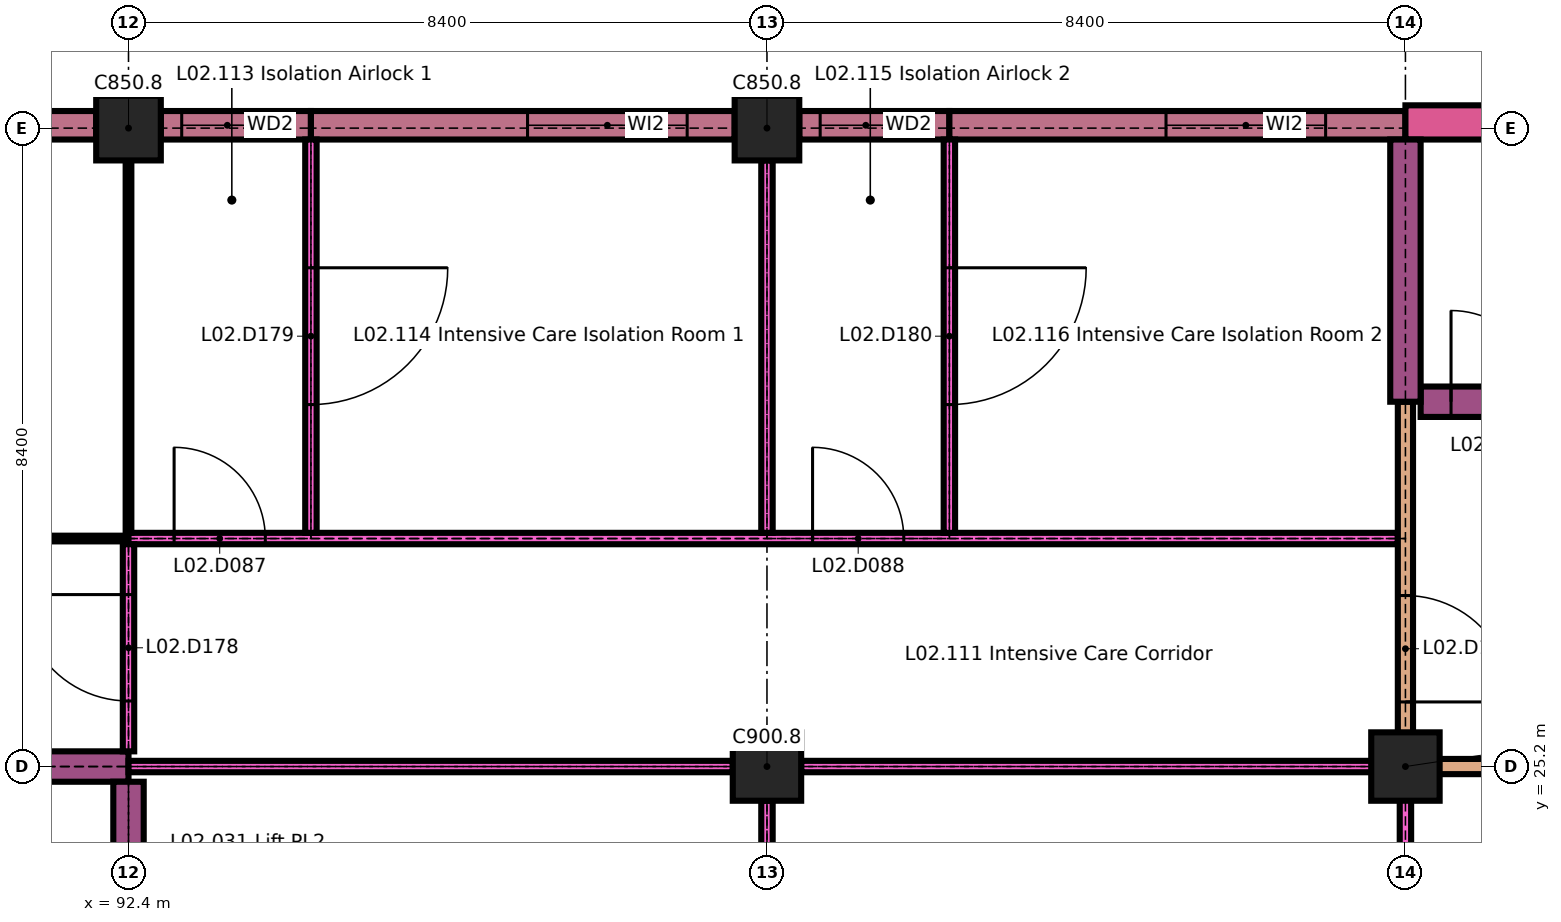
"""IFC4 building model, lengths in metres.
Left out: names, types, materials, properties, quantities, classifications, styles, units other than length and angle.
Written with IfcOpenShell. Run it as: python <this file> out.ifc"""

import sys

from ifc_helpers import new_model, si_unit, direction, frame, frame_2d, origin, origin_2d, place, context, subcontext, project, spatial, rectangle, extrude, element, fill, save


model = new_model("IFC4")
c1 = context("Model", 3, precision=1e-05, world=origin(), true_north=direction((0.0, 1.0)))
c2 = subcontext(c1, "Body", "Model", "MODEL_VIEW")
j1 = project(units=[si_unit("LENGTHUNIT", "METRE"), si_unit("PLANEANGLEUNIT", "RADIAN")], contexts=[c1])
p1 = place(None, origin())
s1 = spatial("IfcSite", under=j1, at=p1, CompositionType="ELEMENT")
p2 = place(p1, origin())
s2 = spatial("IfcBuilding", under=s1, at=p2, CompositionType="ELEMENT")
p3 = place(p2, frame((0.0, 0.0, 8.4)))
s3 = spatial("IfcBuildingStorey", under=s2, at=p3, CompositionType="ELEMENT", Elevation=8.4)
p4 = place(p3, frame((100.8, 25.2, 0.0), z_axis=(0.0, 0.0, 1.0), x_axis=(1.0, 0.0, 0.0)))
e1 = element("IfcColumn", 1, at=p4, inside=s3, PredefinedType="COLUMN", context=c2, shape_type="SweptSolid", body=[
    extrude(rectangle(XDim=0.9, YDim=0.9, at=origin_2d()), origin(), (0.0, 0.0, 1.0), 4.2),
])
for number, where, z_axis, x_axis in (
    (2, (92.4, 33.6, 0.0), (0.0, 0.0, 1.0), (1.0, 0.0, 0.0)),
    (3, (100.8, 33.6, 0.0), (0.0, 0.0, 1.0), (1.0, 0.0, 0.0)),
):
    element("IfcColumn", number, at=place(p3, frame(where, z_axis=z_axis, x_axis=x_axis)), inside=s3, PredefinedType="COLUMN", context=c2, shape_type="SweptSolid", body=[
        extrude(rectangle(XDim=0.85, YDim=0.85, at=origin_2d()), origin(), (0.0, 0.0, 1.0), 4.2),
    ])
p5 = place(p3, frame((84.425, 33.637, 0.0), z_axis=(0.0, 0.0, 1.0), x_axis=(1.0, 0.0, 0.0)))
e4 = element("IfcWall", 4, at=p5, inside=s3, PredefinedType="SOLIDWALL", context=c2, shape_type="SweptSolid", body=[
    extrude(rectangle(XDim=7.55, YDim=0.375, at=frame_2d((3.775, 0.0))), origin(), (0.0, 0.0, 1.0), 3.9),
])
p6 = place(p5, frame((0.925, 0.0, 0.9)))
e5 = element("IfcOpeningElement", 5, at=p6, cuts=e4, PredefinedType="OPENING", context=c2, shape_type="SweptSolid", body=[
    extrude(rectangle(XDim=1.5, YDim=2.1, at=frame_2d((0.75, 1.05))), frame((0.0, 0.198, 0.0), z_axis=(0.0, -1.0, 0.0), x_axis=(1.0, 0.0, 0.0)), (0.0, 0.0, 1.0), 0.395),
])
p7 = place(p5, frame((5.125, 0.0, 0.9)))
e6 = element("IfcOpeningElement", 6, at=p7, cuts=e4, PredefinedType="OPENING", context=c2, shape_type="SweptSolid", body=[
    extrude(rectangle(XDim=1.5, YDim=2.1, at=frame_2d((0.75, 1.05))), frame((0.0, 0.198, 0.0), z_axis=(0.0, -1.0, 0.0), x_axis=(1.0, 0.0, 0.0)), (0.0, 0.0, 1.0), 0.395),
])
p8 = place(p3, frame((92.825, 33.637, 0.0), z_axis=(0.0, 0.0, 1.0), x_axis=(1.0, 0.0, 0.0)))
e7 = element("IfcWall", 7, at=p8, inside=s3, PredefinedType="SOLIDWALL", context=c2, shape_type="SweptSolid", body=[
    extrude(rectangle(XDim=1.975, YDim=0.375, at=frame_2d((0.988, 0.0))), origin(), (0.0, 0.0, 1.0), 3.9),
])
p9 = place(p8, frame((0.275, 0.0, 0.9)))
e8 = element("IfcOpeningElement", 8, at=p9, cuts=e7, PredefinedType="OPENING", context=c2, shape_type="SweptSolid", body=[
    extrude(rectangle(XDim=1.2, YDim=2.1, at=frame_2d((0.6, 1.05))), frame((0.0, 0.198, 0.0), z_axis=(0.0, -1.0, 0.0), x_axis=(1.0, 0.0, 0.0)), (0.0, 0.0, 1.0), 0.395),
])
p10 = place(p3, frame((94.8, 33.637, 0.0), z_axis=(0.0, 0.0, 1.0), x_axis=(1.0, 0.0, 0.0)))
e9 = element("IfcWall", 9, at=p10, inside=s3, PredefinedType="SOLIDWALL", context=c2, shape_type="SweptSolid", body=[
    extrude(rectangle(XDim=5.575, YDim=0.375, at=frame_2d((2.788, 0.0))), origin(), (0.0, 0.0, 1.0), 3.9),
])
p11 = place(p10, frame((2.85, 0.0, 0.9)))
e10 = element("IfcOpeningElement", 10, at=p11, cuts=e9, PredefinedType="OPENING", context=c2, shape_type="SweptSolid", body=[
    extrude(rectangle(XDim=2.1, YDim=2.1, at=frame_2d((1.05, 1.05))), frame((0.0, 0.198, 0.0), z_axis=(0.0, -1.0, 0.0), x_axis=(1.0, 0.0, 0.0)), (0.0, 0.0, 1.0), 0.395),
])
p12 = place(p3, frame((101.225, 33.637, 0.0), z_axis=(0.0, 0.0, 1.0), x_axis=(1.0, 0.0, 0.0)))
e11 = element("IfcWall", 11, at=p12, inside=s3, PredefinedType="SOLIDWALL", context=c2, shape_type="SweptSolid", body=[
    extrude(rectangle(XDim=1.975, YDim=0.375, at=frame_2d((0.987, 0.0))), origin(), (0.0, 0.0, 1.0), 3.9),
])
p13 = place(p12, frame((0.275, 0.0, 0.9)))
e12 = element("IfcOpeningElement", 12, at=p13, cuts=e11, PredefinedType="OPENING", context=c2, shape_type="SweptSolid", body=[
    extrude(rectangle(XDim=1.2, YDim=2.1, at=frame_2d((0.6, 1.05))), frame((0.0, 0.198, 0.0), z_axis=(0.0, -1.0, 0.0), x_axis=(1.0, 0.0, 0.0)), (0.0, 0.0, 1.0), 0.395),
])
p14 = place(p3, frame((103.2, 33.637, 0.0), z_axis=(0.0, 0.0, 1.0), x_axis=(1.0, 0.0, 0.0)))
e13 = element("IfcWall", 13, at=p14, inside=s3, PredefinedType="SOLIDWALL", context=c2, shape_type="SweptSolid", body=[
    extrude(rectangle(XDim=6.0, YDim=0.375, at=frame_2d((3.0, 0.0))), origin(), (0.0, 0.0, 1.0), 3.9),
])
p15 = place(p14, frame((2.85, 0.0, 0.9)))
e14 = element("IfcOpeningElement", 14, at=p15, cuts=e13, PredefinedType="OPENING", context=c2, shape_type="SweptSolid", body=[
    extrude(rectangle(XDim=2.1, YDim=2.1, at=frame_2d((1.05, 1.05))), frame((0.0, 0.198, 0.0), z_axis=(0.0, -1.0, 0.0), x_axis=(1.0, 0.0, 0.0)), (0.0, 0.0, 1.0), 0.395),
])
p16 = place(p3, frame((109.2, 33.675, 0.0), z_axis=(0.0, 0.0, 1.0), x_axis=(1.0, 0.0, 0.0)))
e15 = element("IfcWall", 15, at=p16, inside=s3, PredefinedType="SOLIDWALL", context=c2, shape_type="SweptSolid", body=[
    extrude(rectangle(XDim=3.15, YDim=0.45, at=frame_2d((1.575, 0.0))), origin(), (0.0, 0.0, 1.0), 4.2),
])
p17 = place(p3, frame((75.6, 25.2, 0.0), z_axis=(0.0, 0.0, 1.0), x_axis=(1.0, 0.0, 0.0)))
e16 = element("IfcWall", 16, at=p17, inside=s3, PredefinedType="SHEAR", context=c2, shape_type="SweptSolid", body=[
    extrude(rectangle(XDim=16.8, YDim=0.4, at=frame_2d((8.4, 0.0))), origin(), (0.0, 0.0, 1.0), 4.2),
])
p18 = place(p3, frame((92.4, 25.2, 0.0), z_axis=(0.0, 0.0, 1.0), x_axis=(1.0, 0.0, 0.0)))
e17 = element("IfcWall", 17, at=p18, inside=s3, PredefinedType="PARTITIONING", context=c2, shape_type="SweptSolid", body=[
    extrude(rectangle(XDim=7.95, YDim=0.15, at=frame_2d((3.975, 0.0))), origin(), (0.0, 0.0, 1.0), 4.2),
])
p19 = place(p3, frame((101.25, 25.2, 0.0), z_axis=(0.0, 0.0, 1.0), x_axis=(1.0, 0.0, 0.0)))
e18 = element("IfcWall", 18, at=p19, inside=s3, PredefinedType="PARTITIONING", context=c2, shape_type="SweptSolid", body=[
    extrude(rectangle(XDim=7.95, YDim=0.15, at=frame_2d((3.975, 0.0))), origin(), (0.0, 0.0, 1.0), 4.2),
])
p20 = place(p3, frame((109.2, 25.2, 0.0), z_axis=(0.0, 0.0, 1.0), x_axis=(1.0, 0.0, 0.0)))
e19 = element("IfcWall", 19, at=p20, inside=s3, PredefinedType="PARTITIONING", context=c2, shape_type="SweptSolid", body=[
    extrude(rectangle(XDim=8.4, YDim=0.2, at=frame_2d((4.2, 0.0))), origin(), (0.0, 0.0, 1.0), 4.2),
])
p21 = place(p20, frame((3.5, 0.0, 0.0)))
e20 = element("IfcOpeningElement", 20, at=p21, cuts=e19, PredefinedType="OPENING", context=c2, shape_type="SweptSolid", body=[
    extrude(rectangle(XDim=1.4, YDim=2.1, at=frame_2d((0.7, 1.05))), frame((0.0, 0.11, 0.0), z_axis=(0.0, -1.0, 0.0), x_axis=(1.0, 0.0, 0.0)), (0.0, 0.0, 1.0), 0.22),
])
p22 = place(p3, frame((84.0, 28.2, 0.0), z_axis=(0.0, 0.0, 1.0), x_axis=(1.0, 0.0, 0.0)))
e21 = element("IfcWall", 21, at=p22, inside=s3, PredefinedType="PARTITIONING", context=c2, shape_type="SweptSolid", body=[
    extrude(rectangle(XDim=8.4, YDim=0.075, at=frame_2d((4.2, 0.0))), origin(), (0.0, 0.0, 1.0), 4.2),
])
p23 = place(p22, frame((3.65, 0.0, 0.0)))
e22 = element("IfcOpeningElement", 22, at=p23, cuts=e21, PredefinedType="OPENING", context=c2, shape_type="SweptSolid", body=[
    extrude(rectangle(XDim=1.1, YDim=2.1, at=frame_2d((0.55, 1.05))), frame((0.0, 0.047, 0.0), z_axis=(0.0, -1.0, 0.0), x_axis=(1.0, 0.0, 0.0)), (0.0, 0.0, 1.0), 0.095),
])
p24 = place(p3, frame((92.4, 28.2, 0.0), z_axis=(0.0, 0.0, 1.0), x_axis=(1.0, 0.0, 0.0)))
e23 = element("IfcWall", 23, at=p24, inside=s3, PredefinedType="PARTITIONING", context=c2, shape_type="SweptSolid", body=[
    extrude(rectangle(XDim=16.7, YDim=0.15, at=frame_2d((8.35, 0.0))), origin(), (0.0, 0.0, 1.0), 4.2),
])
p25 = place(p24, frame((0.6, 0.0, 0.0)))
e24 = element("IfcOpeningElement", 24, at=p25, cuts=e23, PredefinedType="OPENING", context=c2, shape_type="SweptSolid", body=[
    extrude(rectangle(XDim=1.2, YDim=2.1, at=frame_2d((0.6, 1.05))), frame((0.0, 0.085, 0.0), z_axis=(0.0, -1.0, 0.0), x_axis=(1.0, 0.0, 0.0)), (0.0, 0.0, 1.0), 0.17),
])
p26 = place(p24, frame((9.0, 0.0, 0.0)))
e25 = element("IfcOpeningElement", 25, at=p26, cuts=e23, PredefinedType="OPENING", context=c2, shape_type="SweptSolid", body=[
    extrude(rectangle(XDim=1.2, YDim=2.1, at=frame_2d((0.6, 1.05))), frame((0.0, 0.085, 0.0), z_axis=(0.0, -1.0, 0.0), x_axis=(1.0, 0.0, 0.0)), (0.0, 0.0, 1.0), 0.17),
])
p27 = place(p3, frame((109.4, 30.0, 0.0), z_axis=(0.0, 0.0, 1.0), x_axis=(1.0, 0.0, 0.0)))
e26 = element("IfcWall", 26, at=p27, inside=s3, PredefinedType="SHEAR", context=c2, shape_type="SweptSolid", body=[
    extrude(rectangle(XDim=8.0, YDim=0.4, at=frame_2d((4.0, 0.0))), origin(), (0.0, 0.0, 1.0), 4.2),
])
p28 = place(p27, frame((0.4, 0.0, 0.0)))
e27 = element("IfcOpeningElement", 27, at=p28, cuts=e26, PredefinedType="OPENING", context=c2, shape_type="SweptSolid", body=[
    extrude(rectangle(XDim=1.2, YDim=2.1, at=frame_2d((0.6, 1.05))), frame((0.0, 0.21, 0.0), z_axis=(0.0, -1.0, 0.0), x_axis=(1.0, 0.0, 0.0)), (0.0, 0.0, 1.0), 0.42),
])
p29 = place(p3, frame((92.4, 21.6, 0.0), z_axis=(0.0, 0.0, 1.0), x_axis=(0.0, 1.0, 0.0)))
e28 = element("IfcWall", 28, at=p29, inside=s3, PredefinedType="SHEAR", context=c2, shape_type="SweptSolid", body=[
    extrude(rectangle(XDim=3.4, YDim=0.4, at=frame_2d((1.7, 0.0))), origin(), (0.0, 0.0, 1.0), 4.2),
])
p30 = place(p3, frame((92.4, 25.4, 0.0), z_axis=(0.0, 0.0, 1.0), x_axis=(0.0, 1.0, 0.0)))
e29 = element("IfcWall", 29, at=p30, inside=s3, PredefinedType="PARTITIONING", context=c2, shape_type="SweptSolid", body=[
    extrude(rectangle(XDim=2.725, YDim=0.15, at=frame_2d((1.363, 0.0))), origin(), (0.0, 0.0, 1.0), 4.2),
])
p31 = place(p30, frame((0.663, 0.0, 0.0)))
e30 = element("IfcOpeningElement", 30, at=p31, cuts=e29, PredefinedType="OPENING", context=c2, shape_type="SweptSolid", body=[
    extrude(rectangle(XDim=1.4, YDim=2.1, at=frame_2d((0.7, 1.05))), frame((0.0, 0.085, 0.0), z_axis=(0.0, -1.0, 0.0), x_axis=(1.0, 0.0, 0.0)), (0.0, 0.0, 1.0), 0.17),
])
p32 = place(p3, frame((92.4, 28.275, 0.0), z_axis=(0.0, 0.0, 1.0), x_axis=(0.0, 1.0, 0.0)))
e31 = element("IfcWall", 31, at=p32, inside=s3, PredefinedType="PARTITIONING", context=c2, shape_type="SweptSolid", body=[
    extrude(rectangle(XDim=4.9, YDim=0.075, at=frame_2d((2.45, 0.0))), origin(), (0.0, 0.0, 1.0), 4.2),
])
p33 = place(p3, frame((94.8, 28.275, 0.0), z_axis=(0.0, 0.0, 1.0), x_axis=(0.0, 1.0, 0.0)))
e32 = element("IfcWall", 32, at=p33, inside=s3, PredefinedType="PARTITIONING", context=c2, shape_type="SweptSolid", body=[
    extrude(rectangle(XDim=5.175, YDim=0.15, at=frame_2d((2.587, 0.0))), origin(), (0.0, 0.0, 1.0), 4.2),
])
p34 = place(p33, frame((1.688, 0.0, 0.0)))
e33 = element("IfcOpeningElement", 33, at=p34, cuts=e32, PredefinedType="OPENING", context=c2, shape_type="SweptSolid", body=[
    extrude(rectangle(XDim=1.8, YDim=2.4, at=frame_2d((0.9, 1.2))), frame((0.0, 0.085, 0.0), z_axis=(0.0, -1.0, 0.0), x_axis=(1.0, 0.0, 0.0)), (0.0, 0.0, 1.0), 0.17),
])
p35 = place(p3, frame((100.8, 17.25, 0.0), z_axis=(0.0, 0.0, 1.0), x_axis=(0.0, 1.0, 0.0)))
e34 = element("IfcWall", 34, at=p35, inside=s3, PredefinedType="PARTITIONING", context=c2, shape_type="SweptSolid", body=[
    extrude(rectangle(XDim=7.5, YDim=0.15, at=frame_2d((3.75, 0.0))), origin(), (0.0, 0.0, 1.0), 4.2),
])
p36 = place(p3, frame((100.8, 28.275, 0.0), z_axis=(0.0, 0.0, 1.0), x_axis=(0.0, 1.0, 0.0)))
e35 = element("IfcWall", 35, at=p36, inside=s3, PredefinedType="PARTITIONING", context=c2, shape_type="SweptSolid", body=[
    extrude(rectangle(XDim=4.9, YDim=0.15, at=frame_2d((2.45, 0.0))), origin(), (0.0, 0.0, 1.0), 4.2),
])
p37 = place(p3, frame((103.2, 28.275, 0.0), z_axis=(0.0, 0.0, 1.0), x_axis=(0.0, 1.0, 0.0)))
e36 = element("IfcWall", 36, at=p37, inside=s3, PredefinedType="PARTITIONING", context=c2, shape_type="SweptSolid", body=[
    extrude(rectangle(XDim=5.175, YDim=0.15, at=frame_2d((2.587, 0.0))), origin(), (0.0, 0.0, 1.0), 4.2),
])
p38 = place(p37, frame((1.688, 0.0, 0.0)))
e37 = element("IfcOpeningElement", 37, at=p38, cuts=e36, PredefinedType="OPENING", context=c2, shape_type="SweptSolid", body=[
    extrude(rectangle(XDim=1.8, YDim=2.4, at=frame_2d((0.9, 1.2))), frame((0.0, 0.085, 0.0), z_axis=(0.0, -1.0, 0.0), x_axis=(1.0, 0.0, 0.0)), (0.0, 0.0, 1.0), 0.17),
])
p39 = place(p3, frame((109.2, 17.25, 0.0), z_axis=(0.0, 0.0, 1.0), x_axis=(0.0, 1.0, 0.0)))
e38 = element("IfcWall", 38, at=p39, inside=s3, PredefinedType="PARTITIONING", context=c2, shape_type="SweptSolid", body=[
    extrude(rectangle(XDim=7.85, YDim=0.15, at=frame_2d((3.925, 0.0))), origin(), (0.0, 0.0, 1.0), 4.2),
])
p40 = place(p3, frame((109.2, 25.3, 0.0), z_axis=(0.0, 0.0, 1.0), x_axis=(0.0, 1.0, 0.0)))
e39 = element("IfcWall", 39, at=p40, inside=s3, PredefinedType="PARTITIONING", context=c2, shape_type="SweptSolid", body=[
    extrude(rectangle(XDim=4.7, YDim=0.2, at=frame_2d((2.35, 0.0))), origin(), (0.0, 0.0, 1.0), 4.2),
])
p41 = place(p40, frame((0.75, 0.0, 0.0)))
e40 = element("IfcOpeningElement", 40, at=p41, cuts=e39, PredefinedType="OPENING", context=c2, shape_type="SweptSolid", body=[
    extrude(rectangle(XDim=1.4, YDim=2.1, at=frame_2d((0.7, 1.05))), frame((0.0, 0.11, 0.0), z_axis=(0.0, -1.0, 0.0), x_axis=(1.0, 0.0, 0.0)), (0.0, 0.0, 1.0), 0.22),
])
p42 = place(p3, frame((109.2, 30.0, 0.0), z_axis=(0.0, 0.0, 1.0), x_axis=(0.0, 1.0, 0.0)))
e41 = element("IfcWall", 41, at=p42, inside=s3, PredefinedType="SHEAR", context=c2, shape_type="SweptSolid", body=[
    extrude(rectangle(XDim=3.45, YDim=0.4, at=frame_2d((1.725, 0.0))), origin(), (0.0, 0.0, 1.0), 4.2),
])
p43 = place(p3, frame((109.2, 25.2, 0.0), z_axis=(0.0, 0.0, 1.0), x_axis=(1.0, 0.0, 0.0)))
e42 = element("IfcColumn", 42, at=p43, inside=s3, PredefinedType="COLUMN", context=c2, shape_type="SweptSolid", body=[
    extrude(rectangle(XDim=0.9, YDim=0.9, at=origin_2d()), origin(), (0.0, 0.0, 1.0), 4.2),
])
p44 = place(p9, origin())
e43 = element("IfcWindow", 43, at=p44, inside=s3, PartitioningType="SINGLE_PANEL", PredefinedType="WINDOW", context=c2, shape_type="SweptSolid", body=[
    extrude(rectangle(XDim=1.2, YDim=2.1, at=frame_2d((0.6, 1.05))), frame((0.0, 0.03, 0.0), z_axis=(0.0, -1.0, 0.0), x_axis=(1.0, 0.0, 0.0)), (0.0, 0.0, 1.0), 0.06),
])
fill(e8, e43)
p45 = place(p11, origin())
e44 = element("IfcWindow", 44, at=p45, inside=s3, PartitioningType="SINGLE_PANEL", PredefinedType="WINDOW", context=c2, shape_type="SweptSolid", body=[
    extrude(rectangle(XDim=2.1, YDim=2.1, at=frame_2d((1.05, 1.05))), frame((0.0, 0.045, 0.0), z_axis=(0.0, -1.0, 0.0), x_axis=(1.0, 0.0, 0.0)), (0.0, 0.0, 1.0), 0.09),
])
fill(e10, e44)
p46 = place(p13, origin())
e45 = element("IfcWindow", 45, at=p46, inside=s3, PartitioningType="SINGLE_PANEL", PredefinedType="WINDOW", context=c2, shape_type="SweptSolid", body=[
    extrude(rectangle(XDim=1.2, YDim=2.1, at=frame_2d((0.6, 1.05))), frame((0.0, 0.03, 0.0), z_axis=(0.0, -1.0, 0.0), x_axis=(1.0, 0.0, 0.0)), (0.0, 0.0, 1.0), 0.06),
])
fill(e12, e45)
p47 = place(p15, origin())
e46 = element("IfcWindow", 46, at=p47, inside=s3, PartitioningType="SINGLE_PANEL", PredefinedType="WINDOW", context=c2, shape_type="SweptSolid", body=[
    extrude(rectangle(XDim=2.1, YDim=2.1, at=frame_2d((1.05, 1.05))), frame((0.0, 0.045, 0.0), z_axis=(0.0, -1.0, 0.0), x_axis=(1.0, 0.0, 0.0)), (0.0, 0.0, 1.0), 0.09),
])
fill(e14, e46)
p48 = place(p25, origin())
e47 = element("IfcDoor", 47, at=p48, inside=s3, OperationType="SINGLE_SWING_RIGHT", PredefinedType="DOOR", context=c2, shape_type="SweptSolid", body=[
    extrude(rectangle(XDim=1.2, YDim=2.1, at=frame_2d((0.6, 1.05))), frame((0.0, 0.05, 0.0), z_axis=(0.0, -1.0, 0.0), x_axis=(1.0, 0.0, 0.0)), (0.0, 0.0, 1.0), 0.1),
])
fill(e24, e47)
p49 = place(p26, origin())
e48 = element("IfcDoor", 48, at=p49, inside=s3, OperationType="SINGLE_SWING_RIGHT", PredefinedType="DOOR", context=c2, shape_type="SweptSolid", body=[
    extrude(rectangle(XDim=1.2, YDim=2.1, at=frame_2d((0.6, 1.05))), frame((0.0, 0.05, 0.0), z_axis=(0.0, -1.0, 0.0), x_axis=(1.0, 0.0, 0.0)), (0.0, 0.0, 1.0), 0.1),
])
fill(e25, e48)
p50 = place(p28, origin())
e49 = element("IfcDoor", 49, at=p50, inside=s3, OperationType="SINGLE_SWING_RIGHT", PredefinedType="DOOR", context=c2, shape_type="SweptSolid", body=[
    extrude(rectangle(XDim=1.2, YDim=2.1, at=frame_2d((0.6, 1.05))), frame((0.0, 0.025, 0.0), z_axis=(0.0, -1.0, 0.0), x_axis=(1.0, 0.0, 0.0)), (0.0, 0.0, 1.0), 0.05),
])
fill(e27, e49)
p51 = place(p31, origin())
e50 = element("IfcDoor", 50, at=p51, inside=s3, OperationType="SINGLE_SWING_LEFT", PredefinedType="DOOR", context=c2, shape_type="SweptSolid", body=[
    extrude(rectangle(XDim=1.4, YDim=2.1, at=frame_2d((0.7, 1.05))), frame((0.0, 0.025, 0.0), z_axis=(0.0, -1.0, 0.0), x_axis=(1.0, 0.0, 0.0)), (0.0, 0.0, 1.0), 0.05),
])
fill(e30, e50)
p52 = place(p34, origin())
e51 = element("IfcDoor", 51, at=p52, inside=s3, OperationType="SINGLE_SWING_RIGHT", PredefinedType="DOOR", context=c2, shape_type="SweptSolid", body=[
    extrude(rectangle(XDim=1.8, YDim=2.4, at=frame_2d((0.9, 1.2))), frame((0.0, 0.05, 0.0), z_axis=(0.0, -1.0, 0.0), x_axis=(1.0, 0.0, 0.0)), (0.0, 0.0, 1.0), 0.1),
])
fill(e33, e51)
p53 = place(p38, origin())
e52 = element("IfcDoor", 52, at=p53, inside=s3, OperationType="SINGLE_SWING_RIGHT", PredefinedType="DOOR", context=c2, shape_type="SweptSolid", body=[
    extrude(rectangle(XDim=1.8, YDim=2.4, at=frame_2d((0.9, 1.2))), frame((0.0, 0.05, 0.0), z_axis=(0.0, -1.0, 0.0), x_axis=(1.0, 0.0, 0.0)), (0.0, 0.0, 1.0), 0.1),
])
fill(e37, e52)
p54 = place(p41, origin())
e53 = element("IfcDoor", 53, at=p54, inside=s3, OperationType="SINGLE_SWING_LEFT", PredefinedType="DOOR", context=c2, shape_type="SweptSolid", body=[
    extrude(rectangle(XDim=1.4, YDim=2.1, at=frame_2d((0.7, 1.05))), frame((0.0, 0.03, 0.0), z_axis=(0.0, -1.0, 0.0), x_axis=(1.0, 0.0, 0.0)), (0.0, 0.0, 1.0), 0.06),
])
fill(e40, e53)
save(model, sys.argv[1])
